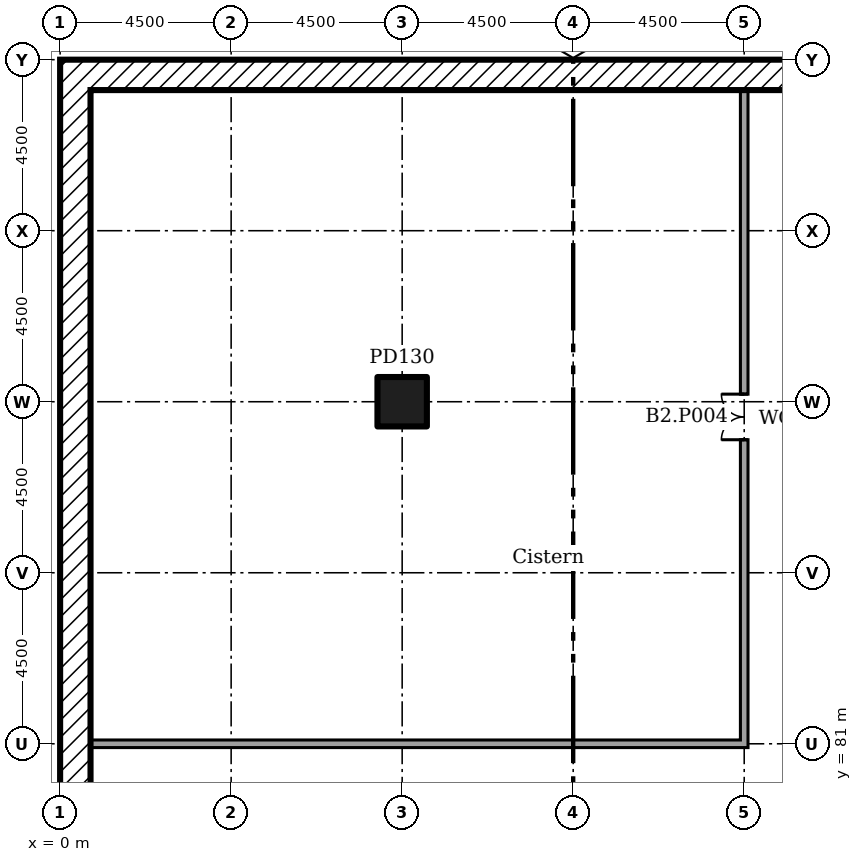
"""IFC4 building model, lengths in metres.
Left out: names, types, materials, properties, quantities, classifications, styles, units other than length and angle.
Written with IfcOpenShell. Run it as: python <this file> out.ifc"""

import sys

from ifc_helpers import new_model, si_unit, direction, frame, frame_2d, origin, origin_2d, place, context, subcontext, project, spatial, rectangle, extrude, element, fill, save


model = new_model("IFC4")
c1 = context("Model", 3, precision=1e-05, world=origin(), true_north=direction((0.0, 1.0)))
c2 = subcontext(c1, "Body", "Model", "MODEL_VIEW")
j1 = project(units=[si_unit("LENGTHUNIT", "METRE"), si_unit("PLANEANGLEUNIT", "RADIAN")], contexts=[c1])
p1 = place(None, origin())
s1 = spatial("IfcSite", under=j1, at=p1, CompositionType="ELEMENT")
p2 = place(p1, origin())
s2 = spatial("IfcBuilding", under=s1, at=p2, CompositionType="ELEMENT")
p3 = place(p2, frame((0.0, 0.0, -8.0)))
s3 = spatial("IfcBuildingStorey", under=s2, at=p3, CompositionType="ELEMENT", Elevation=-8.0)
p4 = place(p3, frame((9.0, 90.0, 0.0)))
e1 = element("IfcColumn", 1, at=p4, inside=s3, PredefinedType="COLUMN", context=c2, shape_type="SweptSolid", body=[
    extrude(rectangle(XDim=1.3, YDim=1.3, at=origin_2d()), origin(), (0.0, 0.0, 1.0), 4.0),
])
p5 = place(p3, frame((0.0, 98.6, 0.0)))
e2 = element("IfcWall", 2, at=p5, inside=s3, PredefinedType="SOLIDWALL", context=c2, shape_type="SweptSolid", body=[
    extrude(rectangle(XDim=153.0, YDim=0.8, at=frame_2d((76.5, 0.0))), origin(), (0.0, 0.0, 1.0), 4.0),
])
p6 = place(p3, frame((0.4, 0.8, 0.0), z_axis=(0.0, 0.0, 1.0), x_axis=(0.0, 1.0, 0.0)))
e3 = element("IfcWall", 3, at=p6, inside=s3, PredefinedType="SOLIDWALL", context=c2, shape_type="SweptSolid", body=[
    extrude(rectangle(XDim=97.4, YDim=0.8, at=frame_2d((48.7, 0.0))), origin(), (0.0, 0.0, 1.0), 4.0),
])
p7 = place(p3, frame((18.0, 80.9, 0.0), z_axis=(0.0, 0.0, 1.0), x_axis=(0.0, 1.0, 0.0)))
e4 = element("IfcWall", 4, at=p7, inside=s3, PredefinedType="SOLIDWALL", context=c2, shape_type="SweptSolid", body=[
    extrude(rectangle(XDim=17.3, YDim=0.2, at=frame_2d((8.65, 0.0))), origin(), (0.0, 0.0, 1.0), 3.55),
])
p8 = place(p7, frame((8.1, 0.0, 0.0)))
e5 = element("IfcOpeningElement", 5, at=p8, cuts=e4, PredefinedType="OPENING", context=c2, shape_type="SweptSolid", body=[
    extrude(rectangle(XDim=1.2, YDim=2.1, at=frame_2d((0.6, 1.05))), frame((0.0, 0.11, 0.0), z_axis=(0.0, -1.0, 0.0), x_axis=(1.0, 0.0, 0.0)), (0.0, 0.0, 1.0), 0.22),
])
p9 = place(p3, frame((0.8, 81.0, 0.0)))
e6 = element("IfcWall", 6, at=p9, inside=s3, PredefinedType="SOLIDWALL", context=c2, shape_type="SweptSolid", body=[
    extrude(rectangle(XDim=17.1, YDim=0.2, at=frame_2d((8.55, 0.0))), origin(), (0.0, 0.0, 1.0), 3.55),
])
p10 = place(p8, origin())
e7 = element("IfcDoor", 7, at=p10, inside=s3, OperationType="DOUBLE_DOOR_SINGLE_SWING", PredefinedType="DOOR", context=c2, shape_type="SweptSolid", body=[
    extrude(rectangle(XDim=1.2, YDim=2.1, at=frame_2d((0.6, 1.05))), frame((0.0, 0.025, 0.0), z_axis=(0.0, -1.0, 0.0), x_axis=(1.0, 0.0, 0.0)), (0.0, 0.0, 1.0), 0.05),
])
fill(e5, e7)
save(model, sys.argv[1])
